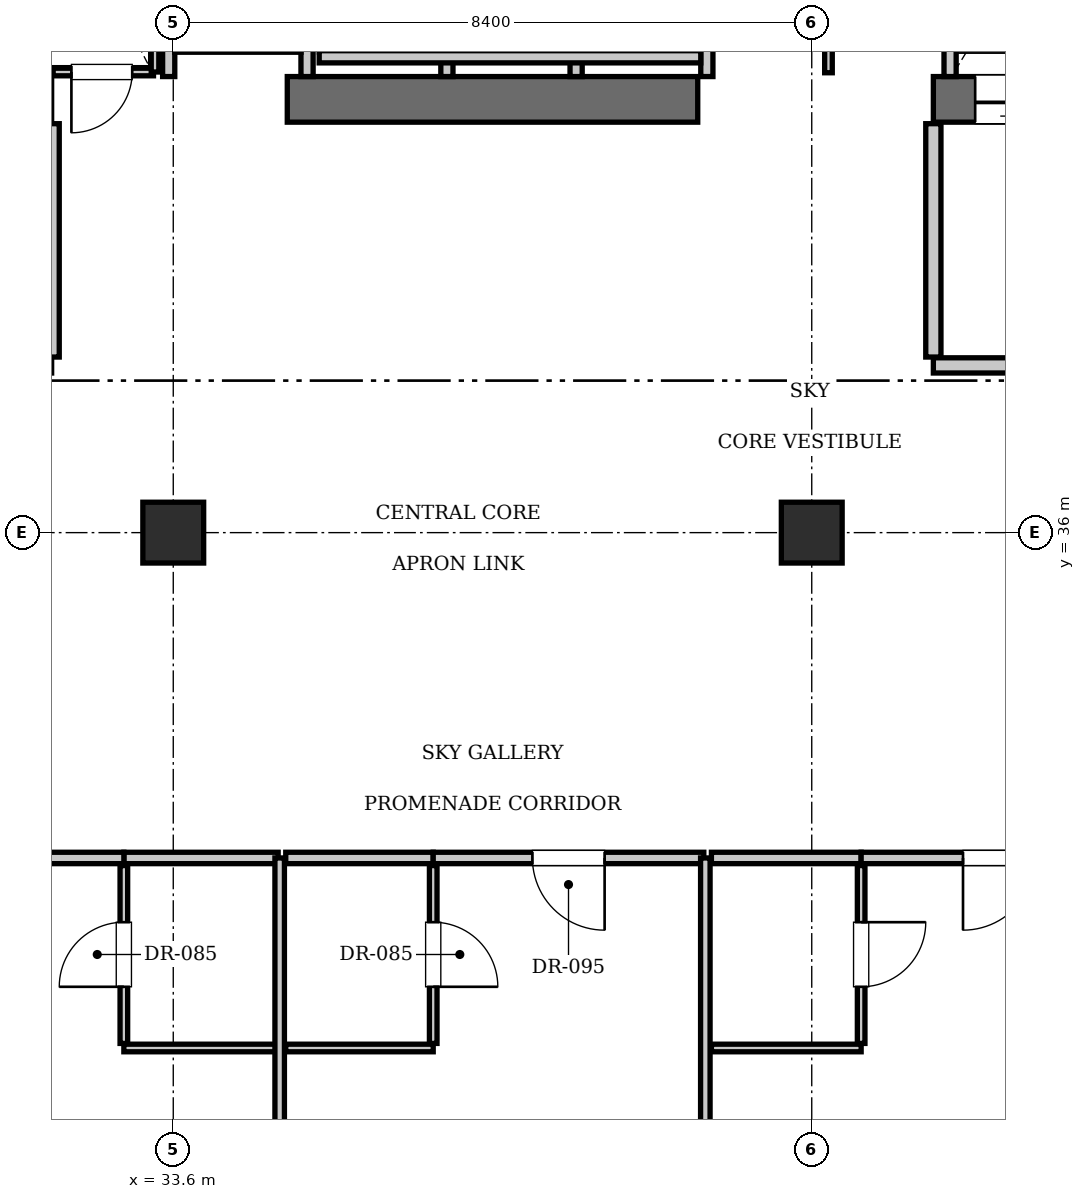
"""IFC4 building model, lengths in metres.
Left out: names, types, materials, properties, quantities, classifications, styles, units other than length and angle.
Written with IfcOpenShell. Run it as: python <this file> out.ifc"""

import sys

from ifc_helpers import new_model, si_unit, direction, frame, frame_2d, origin, origin_2d, place, context, subcontext, project, spatial, rectangle, extrude, element, fill, save


model = new_model("IFC4")
c1 = context("Model", 3, precision=1e-05, world=origin(), true_north=direction((0.0, 1.0)))
c2 = subcontext(c1, "Body", "Model", "MODEL_VIEW")
j1 = project(units=[si_unit("LENGTHUNIT", "METRE"), si_unit("PLANEANGLEUNIT", "RADIAN")], contexts=[c1])
p1 = place(None, origin())
s1 = spatial("IfcSite", under=j1, at=p1, CompositionType="ELEMENT")
p2 = place(p1, origin())
s2 = spatial("IfcBuilding", under=s1, at=p2, CompositionType="ELEMENT")
p3 = place(p2, frame((0.0, 0.0, 333.55)))
s3 = spatial("IfcBuildingStorey", under=s2, at=p3, CompositionType="ELEMENT", Elevation=333.55)
p4 = place(p3, frame((35.1, 41.7, 0.0), z_axis=(0.0, 0.0, 1.0), x_axis=(1.0, 0.0, 0.0)))
e1 = element("IfcWall", 1, at=p4, inside=s3, PredefinedType="SHEAR", context=c2, shape_type="SweptSolid", body=[
    extrude(rectangle(XDim=5.4, YDim=0.6, at=frame_2d((2.7, 0.0))), origin(), (0.0, 0.0, 1.0), 3.85),
])
p5 = place(p3, frame((43.6, 41.7, 0.0), z_axis=(0.0, 0.0, 1.0), x_axis=(1.0, 0.0, 0.0)))
e2 = element("IfcWall", 2, at=p5, inside=s3, PredefinedType="SHEAR", context=c2, shape_type="SweptSolid", body=[
    extrude(rectangle(XDim=6.8, YDim=0.6, at=frame_2d((3.4, 0.0))), origin(), (0.0, 0.0, 1.0), 3.85),
])
p6 = place(p5, frame((3.9, 0.0, 0.0)))
e3 = element("IfcOpeningElement", 3, at=p6, cuts=e2, PredefinedType="OPENING", context=c2, shape_type="SweptSolid", body=[
    extrude(rectangle(XDim=1.15, YDim=2.15, at=frame_2d((0.575, 1.075))), frame((0.0, 0.31, 0.0), z_axis=(0.0, -1.0, 0.0), x_axis=(1.0, 0.0, 0.0)), (0.0, 0.0, 1.0), 0.62),
])
p7 = place(p5, frame((0.55, 0.0, 0.0)))
e4 = element("IfcOpeningElement", 4, at=p7, cuts=e2, PredefinedType="OPENING", context=c2, shape_type="SweptSolid", body=[
    extrude(rectangle(XDim=1.1, YDim=2.2, at=frame_2d((0.55, 1.1))), frame((0.0, 0.31, 0.0), z_axis=(0.0, -1.0, 0.0), x_axis=(1.0, 0.0, 0.0)), (0.0, 0.0, 1.0), 0.62),
])
for number, where, z_axis, x_axis in (
    (5, (33.6, 36.0, 0.0), (0.0, 0.0, 1.0), (1.0, 0.0, 0.0)),
    (6, (42.0, 36.0, 0.0), (0.0, 0.0, 1.0), (1.0, 0.0, 0.0)),
):
    element("IfcColumn", number, at=place(p3, frame(where, z_axis=z_axis, x_axis=x_axis)), inside=s3, PredefinedType="COLUMN", context=c2, shape_type="SweptSolid", body=[
        extrude(rectangle(XDim=0.8, YDim=0.8, at=origin_2d()), origin(), (0.0, 0.0, 1.0), 3.85),
    ])
p8 = place(p3, frame((43.82, 42.0, 0.0), z_axis=(0.0, 0.0, 1.0), x_axis=(0.0, 1.0, 0.0)))
e7 = element("IfcWall", 7, at=p8, inside=s3, PredefinedType="SOLIDWALL", context=c2, shape_type="SweptSolid", body=[
    extrude(rectangle(XDim=2.74, YDim=0.16, at=frame_2d((1.37, 0.0))), origin(), (0.0, 0.0, 1.0), 3.61),
])
for number, where, z_axis, x_axis in (
    (8, (37.2, 42.0, 0.0), (0.0, 0.0, 1.0), (0.0, 1.0, 0.0)),
    (9, (38.9, 42.0, 0.0), (0.0, 0.0, 1.0), (0.0, 1.0, 0.0)),
    (10, (40.62, 42.0, 0.0), (0.0, 0.0, 1.0), (0.0, 1.0, 0.0)),
):
    element("IfcWall", number, at=place(p3, frame(where, z_axis=z_axis, x_axis=x_axis)), inside=s3, PredefinedType="SOLIDWALL", context=c2, shape_type="SweptSolid", body=[
        extrude(rectangle(XDim=2.35, YDim=0.16, at=frame_2d((1.175, 0.0))), origin(), (0.0, 0.0, 1.0), 3.61),
    ])
p9 = place(p3, frame((35.52, 42.26, 0.0), z_axis=(0.0, 0.0, 1.0), x_axis=(1.0, 0.0, 0.0)))
e11 = element("IfcWall", 11, at=p9, inside=s3, PredefinedType="SOLIDWALL", context=c2, shape_type="SweptSolid", body=[
    extrude(rectangle(XDim=5.02, YDim=0.16, at=frame_2d((2.51, 0.0))), origin(), (0.0, 0.0, 1.0), 3.61),
])
for number, where, z_axis, x_axis in (
    (12, (33.54, 42.0, 0.0), (0.0, 0.0, 1.0), (0.0, 1.0, 0.0)),
    (13, (35.36, 42.0, 0.0), (0.0, 0.0, 1.0), (0.0, 1.0, 0.0)),
):
    element("IfcWall", number, at=place(p3, frame(where, z_axis=z_axis, x_axis=x_axis)), inside=s3, PredefinedType="SOLIDWALL", context=c2, shape_type="SweptSolid", body=[
        extrude(rectangle(XDim=2.4, YDim=0.16, at=frame_2d((1.2, 0.0))), origin(), (0.0, 0.0, 1.0), 3.61),
    ])
p10 = place(p3, frame((33.62, 42.4, 0.0), z_axis=(0.0, 0.0, 1.0), x_axis=(1.0, 0.0, 0.0)))
e14 = element("IfcWall", 14, at=p10, inside=s3, PredefinedType="SOLIDWALL", context=c2, shape_type="SweptSolid", body=[
    extrude(rectangle(XDim=1.66, YDim=0.16, at=frame_2d((0.83, 0.0))), origin(), (0.0, 0.0, 1.0), 3.61),
])
p11 = place(p3, frame((32.0, 38.31, 0.0), z_axis=(0.0, 0.0, 1.0), x_axis=(0.0, 1.0, 0.0)))
e15 = element("IfcWall", 15, at=p11, inside=s3, PredefinedType="PARTITIONING", context=c2, shape_type="SweptSolid", body=[
    extrude(rectangle(XDim=3.07, YDim=0.2, at=frame_2d((1.535, 0.0))), origin(), (0.0, 0.0, 1.0), 3.61),
])
p12 = place(p3, frame((43.6, 38.2, 0.0), z_axis=(0.0, 0.0, 1.0), x_axis=(1.0, 0.0, 0.0)))
e16 = element("IfcWall", 16, at=p12, inside=s3, PredefinedType="PARTITIONING", context=c2, shape_type="SweptSolid", body=[
    extrude(rectangle(XDim=5.8, YDim=0.2, at=frame_2d((2.9, 0.0))), origin(), (0.0, 0.0, 1.0), 3.61),
])
p13 = place(p12, frame((2.3, 0.0, 0.0)))
e17 = element("IfcOpeningElement", 17, at=p13, cuts=e16, PredefinedType="OPENING", context=c2, shape_type="SweptSolid", body=[
    extrude(rectangle(XDim=1.15, YDim=2.15, at=frame_2d((0.575, 1.075))), frame((0.0, 0.11, 0.0), z_axis=(0.0, -1.0, 0.0), x_axis=(1.0, 0.0, 0.0)), (0.0, 0.0, 1.0), 0.22),
])
p14 = place(p3, frame((43.6, 38.31, 0.0), z_axis=(0.0, 0.0, 1.0), x_axis=(0.0, 1.0, 0.0)))
e18 = element("IfcWall", 18, at=p14, inside=s3, PredefinedType="PARTITIONING", context=c2, shape_type="SweptSolid", body=[
    extrude(rectangle(XDim=3.07, YDim=0.2, at=frame_2d((1.535, 0.0))), origin(), (0.0, 0.0, 1.0), 3.61),
])
p15 = place(p3, frame((32.02, 42.06, 0.0), z_axis=(0.0, 0.0, 1.0), x_axis=(1.0, 0.0, 0.0)))
e19 = element("IfcWall", 19, at=p15, inside=s3, PredefinedType="PARTITIONING", context=c2, shape_type="SweptSolid", body=[
    extrude(rectangle(XDim=1.32, YDim=0.1, at=frame_2d((0.66, 0.0))), origin(), (0.0, 0.0, 1.0), 3.61),
])
p16 = place(p15, frame((0.24, 0.0, 0.0)))
e20 = element("IfcOpeningElement", 20, at=p16, cuts=e19, PredefinedType="OPENING", context=c2, shape_type="SweptSolid", body=[
    extrude(rectangle(XDim=0.8, YDim=2.05, at=frame_2d((0.4, 1.025))), frame((0.0, 0.06, 0.0), z_axis=(0.0, -1.0, 0.0), x_axis=(1.0, 0.0, 0.0)), (0.0, 0.0, 1.0), 0.12),
])
p17 = place(p3, frame((33.36, 42.06, 0.0), z_axis=(0.0, 0.0, 1.0), x_axis=(0.0, 1.0, 0.0)))
e21 = element("IfcWall", 21, at=p17, inside=s3, PredefinedType="PARTITIONING", context=c2, shape_type="SweptSolid", body=[
    extrude(rectangle(XDim=2.88, YDim=0.1, at=frame_2d((1.44, 0.0))), origin(), (0.0, 0.0, 1.0), 3.61),
])
p18 = place(p3, frame((42.22, 42.05, 0.0), z_axis=(0.0, 0.0, 1.0), x_axis=(0.0, 1.0, 0.0)))
e22 = element("IfcWall", 22, at=p18, inside=s3, PredefinedType="PARTITIONING", context=c2, shape_type="SweptSolid", body=[
    extrude(rectangle(XDim=2.91, YDim=0.1, at=frame_2d((1.455, 0.0))), origin(), (0.0, 0.0, 1.0), 3.61),
])
p19 = place(p18, frame((0.65, 0.0, 0.0)))
e23 = element("IfcOpeningElement", 23, at=p19, cuts=e22, PredefinedType="OPENING", context=c2, shape_type="SweptSolid", body=[
    extrude(rectangle(XDim=0.8, YDim=2.05, at=frame_2d((0.4, 1.025))), frame((0.0, 0.06, 0.0), z_axis=(0.0, -1.0, 0.0), x_axis=(1.0, 0.0, 0.0)), (0.0, 0.0, 1.0), 0.12),
])
p20 = place(p3, frame((32.95, 31.72, 0.0), z_axis=(0.0, 0.0, 1.0), x_axis=(1.0, 0.0, 0.0)))
e24 = element("IfcWall", 24, at=p20, inside=s3, PredefinedType="PARTITIONING", context=c2, shape_type="SweptSolid", body=[
    extrude(rectangle(XDim=2.03, YDim=0.15, at=frame_2d((1.015, 0.0))), origin(), (0.0, 0.0, 1.0), 3.61),
])
p21 = place(p3, frame((32.95, 29.22, 0.0), z_axis=(0.0, 0.0, 1.0), x_axis=(1.0, 0.0, 0.0)))
e25 = element("IfcWall", 25, at=p21, inside=s3, PredefinedType="PARTITIONING", context=c2, shape_type="SweptSolid", body=[
    extrude(rectangle(XDim=2.01, YDim=0.1, at=frame_2d((1.005, 0.0))), origin(), (0.0, 0.0, 1.0), 3.61),
])
p22 = place(p3, frame((32.95, 29.28, 0.0), z_axis=(0.0, 0.0, 1.0), x_axis=(0.0, 1.0, 0.0)))
e26 = element("IfcWall", 26, at=p22, inside=s3, PredefinedType="PARTITIONING", context=c2, shape_type="SweptSolid", body=[
    extrude(rectangle(XDim=2.34, YDim=0.1, at=frame_2d((1.17, 0.0))), origin(), (0.0, 0.0, 1.0), 3.61),
])
p23 = place(p22, frame((0.745, 0.0, 0.0)))
e27 = element("IfcOpeningElement", 27, at=p23, cuts=e26, PredefinedType="OPENING", context=c2, shape_type="SweptSolid", body=[
    extrude(rectangle(XDim=0.85, YDim=2.1, at=frame_2d((0.425, 1.05))), frame((0.0, 0.06, 0.0), z_axis=(0.0, -1.0, 0.0), x_axis=(1.0, 0.0, 0.0)), (0.0, 0.0, 1.0), 0.12),
])
p24 = place(p3, frame((29.32, 31.72, 0.0), z_axis=(0.0, 0.0, 1.0), x_axis=(1.0, 0.0, 0.0)))
e28 = element("IfcWall", 28, at=p24, inside=s3, PredefinedType="PARTITIONING", context=c2, shape_type="SweptSolid", body=[
    extrude(rectangle(XDim=3.63, YDim=0.15, at=frame_2d((1.815, 0.0))), origin(), (0.0, 0.0, 1.0), 3.61),
])
p25 = place(p24, frame((1.34, 0.0, 0.0)))
e29 = element("IfcOpeningElement", 29, at=p25, cuts=e28, PredefinedType="OPENING", context=c2, shape_type="SweptSolid", body=[
    extrude(rectangle(XDim=0.95, YDim=2.15, at=frame_2d((0.475, 1.075))), frame((0.0, 0.085, 0.0), z_axis=(0.0, -1.0, 0.0), x_axis=(1.0, 0.0, 0.0)), (0.0, 0.0, 1.0), 0.17),
])
p26 = place(p3, frame((35.0, 13.9, 0.0), z_axis=(0.0, 0.0, 1.0), x_axis=(0.0, 1.0, 0.0)))
e30 = element("IfcWall", 30, at=p26, inside=s3, PredefinedType="PARTITIONING", context=c2, shape_type="SweptSolid", body=[
    extrude(rectangle(XDim=17.82, YDim=0.125, at=frame_2d((8.91, 0.0))), origin(), (0.0, 0.0, 1.0), 3.61),
])
p27 = place(p3, frame((35.08, 31.72, 0.0), z_axis=(0.0, 0.0, 1.0), x_axis=(1.0, 0.0, 0.0)))
e31 = element("IfcWall", 31, at=p27, inside=s3, PredefinedType="PARTITIONING", context=c2, shape_type="SweptSolid", body=[
    extrude(rectangle(XDim=1.94, YDim=0.15, at=frame_2d((0.97, 0.0))), origin(), (0.0, 0.0, 1.0), 3.61),
])
p28 = place(p3, frame((35.08, 29.22, 0.0), z_axis=(0.0, 0.0, 1.0), x_axis=(1.0, 0.0, 0.0)))
e32 = element("IfcWall", 32, at=p28, inside=s3, PredefinedType="PARTITIONING", context=c2, shape_type="SweptSolid", body=[
    extrude(rectangle(XDim=1.94, YDim=0.1, at=frame_2d((0.97, 0.0))), origin(), (0.0, 0.0, 1.0), 3.61),
])
p29 = place(p3, frame((37.02, 29.28, 0.0), z_axis=(0.0, 0.0, 1.0), x_axis=(0.0, 1.0, 0.0)))
e33 = element("IfcWall", 33, at=p29, inside=s3, PredefinedType="PARTITIONING", context=c2, shape_type="SweptSolid", body=[
    extrude(rectangle(XDim=2.34, YDim=0.1, at=frame_2d((1.17, 0.0))), origin(), (0.0, 0.0, 1.0), 3.61),
])
p30 = place(p29, frame((0.745, 0.0, 0.0)))
e34 = element("IfcOpeningElement", 34, at=p30, cuts=e33, PredefinedType="OPENING", context=c2, shape_type="SweptSolid", body=[
    extrude(rectangle(XDim=0.85, YDim=2.1, at=frame_2d((0.425, 1.05))), frame((0.0, 0.06, 0.0), z_axis=(0.0, -1.0, 0.0), x_axis=(1.0, 0.0, 0.0)), (0.0, 0.0, 1.0), 0.12),
])
p31 = place(p3, frame((37.02, 31.72, 0.0), z_axis=(0.0, 0.0, 1.0), x_axis=(1.0, 0.0, 0.0)))
e35 = element("IfcWall", 35, at=p31, inside=s3, PredefinedType="PARTITIONING", context=c2, shape_type="SweptSolid", body=[
    extrude(rectangle(XDim=3.56, YDim=0.15, at=frame_2d((1.78, 0.0))), origin(), (0.0, 0.0, 1.0), 3.61),
])
p32 = place(p31, frame((1.305, 0.0, 0.0)))
e36 = element("IfcOpeningElement", 36, at=p32, cuts=e35, PredefinedType="OPENING", context=c2, shape_type="SweptSolid", body=[
    extrude(rectangle(XDim=0.95, YDim=2.15, at=frame_2d((0.475, 1.075))), frame((0.0, 0.085, 0.0), z_axis=(0.0, -1.0, 0.0), x_axis=(1.0, 0.0, 0.0)), (0.0, 0.0, 1.0), 0.17),
])
p33 = place(p3, frame((40.6, 13.9, 0.0), z_axis=(0.0, 0.0, 1.0), x_axis=(0.0, 1.0, 0.0)))
e37 = element("IfcWall", 37, at=p33, inside=s3, PredefinedType="PARTITIONING", context=c2, shape_type="SweptSolid", body=[
    extrude(rectangle(XDim=17.82, YDim=0.125, at=frame_2d((8.91, 0.0))), origin(), (0.0, 0.0, 1.0), 3.61),
])
p34 = place(p3, frame((40.68, 31.72, 0.0), z_axis=(0.0, 0.0, 1.0), x_axis=(1.0, 0.0, 0.0)))
e38 = element("IfcWall", 38, at=p34, inside=s3, PredefinedType="PARTITIONING", context=c2, shape_type="SweptSolid", body=[
    extrude(rectangle(XDim=1.97, YDim=0.15, at=frame_2d((0.985, 0.0))), origin(), (0.0, 0.0, 1.0), 3.61),
])
p35 = place(p3, frame((40.68, 29.22, 0.0), z_axis=(0.0, 0.0, 1.0), x_axis=(1.0, 0.0, 0.0)))
e39 = element("IfcWall", 39, at=p35, inside=s3, PredefinedType="PARTITIONING", context=c2, shape_type="SweptSolid", body=[
    extrude(rectangle(XDim=1.97, YDim=0.1, at=frame_2d((0.985, 0.0))), origin(), (0.0, 0.0, 1.0), 3.61),
])
p36 = place(p3, frame((42.65, 29.28, 0.0), z_axis=(0.0, 0.0, 1.0), x_axis=(0.0, 1.0, 0.0)))
e40 = element("IfcWall", 40, at=p36, inside=s3, PredefinedType="PARTITIONING", context=c2, shape_type="SweptSolid", body=[
    extrude(rectangle(XDim=2.34, YDim=0.1, at=frame_2d((1.17, 0.0))), origin(), (0.0, 0.0, 1.0), 3.61),
])
p37 = place(p36, frame((0.745, 0.0, 0.0)))
e41 = element("IfcOpeningElement", 41, at=p37, cuts=e40, PredefinedType="OPENING", context=c2, shape_type="SweptSolid", body=[
    extrude(rectangle(XDim=0.85, YDim=2.1, at=frame_2d((0.425, 1.05))), frame((0.0, 0.06, 0.0), z_axis=(0.0, -1.0, 0.0), x_axis=(1.0, 0.0, 0.0)), (0.0, 0.0, 1.0), 0.12),
])
p38 = place(p3, frame((42.65, 31.72, 0.0), z_axis=(0.0, 0.0, 1.0), x_axis=(1.0, 0.0, 0.0)))
e42 = element("IfcWall", 42, at=p38, inside=s3, PredefinedType="PARTITIONING", context=c2, shape_type="SweptSolid", body=[
    extrude(rectangle(XDim=3.63, YDim=0.15, at=frame_2d((1.815, 0.0))), origin(), (0.0, 0.0, 1.0), 3.61),
])
p39 = place(p38, frame((1.34, 0.0, 0.0)))
e43 = element("IfcOpeningElement", 43, at=p39, cuts=e42, PredefinedType="OPENING", context=c2, shape_type="SweptSolid", body=[
    extrude(rectangle(XDim=0.95, YDim=2.15, at=frame_2d((0.475, 1.075))), frame((0.0, 0.085, 0.0), z_axis=(0.0, -1.0, 0.0), x_axis=(1.0, 0.0, 0.0)), (0.0, 0.0, 1.0), 0.17),
])
p40 = place(p7, frame((1.1, 0.0, 0.0), z_axis=(0.0, 0.0, 1.0), x_axis=(-1.0, 0.0, 0.0)))
e44 = element("IfcDoor", 44, at=p40, inside=s3, OperationType="SLIDING_TO_LEFT", PredefinedType="DOOR", context=c2, shape_type="SweptSolid", body=[
    extrude(rectangle(XDim=1.1, YDim=2.2, at=frame_2d((0.55, 1.1))), frame((0.0, 0.025, 0.0), z_axis=(0.0, -1.0, 0.0), x_axis=(1.0, 0.0, 0.0)), (0.0, 0.0, 1.0), 0.05),
])
fill(e4, e44)
p41 = place(p16, frame((0.8, 0.0, 0.0), z_axis=(0.0, 0.0, 1.0), x_axis=(-1.0, 0.0, 0.0)))
e45 = element("IfcDoor", 45, at=p41, inside=s3, OperationType="SINGLE_SWING_RIGHT", PredefinedType="DOOR", context=c2, shape_type="SweptSolid", body=[
    extrude(rectangle(XDim=0.8, YDim=2.05, at=frame_2d((0.4, 1.025))), frame((0.0, 0.025, 0.0), z_axis=(0.0, -1.0, 0.0), x_axis=(1.0, 0.0, 0.0)), (0.0, 0.0, 1.0), 0.05),
])
fill(e20, e45)
p42 = place(p23, origin())
e46 = element("IfcDoor", 46, at=p42, inside=s3, OperationType="SINGLE_SWING_LEFT", PredefinedType="DOOR", context=c2, shape_type="SweptSolid", body=[
    extrude(rectangle(XDim=0.85, YDim=2.1, at=frame_2d((0.425, 1.05))), frame((0.0, 0.025, 0.0), z_axis=(0.0, -1.0, 0.0), x_axis=(1.0, 0.0, 0.0)), (0.0, 0.0, 1.0), 0.05),
])
fill(e27, e46)
p43 = place(p30, frame((0.85, 0.0, 0.0), z_axis=(0.0, 0.0, 1.0), x_axis=(-1.0, 0.0, 0.0)))
e47 = element("IfcDoor", 47, at=p43, inside=s3, OperationType="SINGLE_SWING_RIGHT", PredefinedType="DOOR", context=c2, shape_type="SweptSolid", body=[
    extrude(rectangle(XDim=0.85, YDim=2.1, at=frame_2d((0.425, 1.05))), frame((0.0, 0.025, 0.0), z_axis=(0.0, -1.0, 0.0), x_axis=(1.0, 0.0, 0.0)), (0.0, 0.0, 1.0), 0.05),
])
fill(e34, e47)
p44 = place(p32, frame((0.95, 0.0, 0.0), z_axis=(0.0, 0.0, 1.0), x_axis=(-1.0, 0.0, 0.0)))
e48 = element("IfcDoor", 48, at=p44, inside=s3, OperationType="SINGLE_SWING_LEFT", PredefinedType="DOOR", context=c2, shape_type="SweptSolid", body=[
    extrude(rectangle(XDim=0.95, YDim=2.15, at=frame_2d((0.475, 1.075))), frame((0.0, 0.025, 0.0), z_axis=(0.0, -1.0, 0.0), x_axis=(1.0, 0.0, 0.0)), (0.0, 0.0, 1.0), 0.05),
])
fill(e36, e48)
p45 = place(p37, frame((0.85, 0.0, 0.0), z_axis=(0.0, 0.0, 1.0), x_axis=(-1.0, 0.0, 0.0)))
e49 = element("IfcDoor", 49, at=p45, inside=s3, OperationType="SINGLE_SWING_LEFT", PredefinedType="DOOR", context=c2, shape_type="SweptSolid", body=[
    extrude(rectangle(XDim=0.85, YDim=2.1, at=frame_2d((0.425, 1.05))), frame((0.0, 0.025, 0.0), z_axis=(0.0, -1.0, 0.0), x_axis=(1.0, 0.0, 0.0)), (0.0, 0.0, 1.0), 0.05),
])
fill(e41, e49)
p46 = place(p39, frame((0.95, 0.0, 0.0), z_axis=(0.0, 0.0, 1.0), x_axis=(-1.0, 0.0, 0.0)))
e50 = element("IfcDoor", 50, at=p46, inside=s3, OperationType="SINGLE_SWING_RIGHT", PredefinedType="DOOR", context=c2, shape_type="SweptSolid", body=[
    extrude(rectangle(XDim=0.95, YDim=2.15, at=frame_2d((0.475, 1.075))), frame((0.0, 0.025, 0.0), z_axis=(0.0, -1.0, 0.0), x_axis=(1.0, 0.0, 0.0)), (0.0, 0.0, 1.0), 0.05),
])
fill(e43, e50)
save(model, sys.argv[1])
